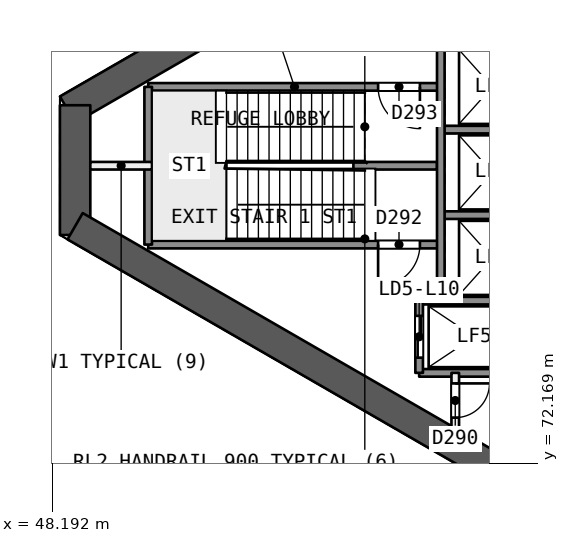
"""IFC4 building model, lengths in metres.
Left out: names, types, materials, properties, quantities, classifications, styles, units other than length and angle.
Written with IfcOpenShell. Run it as: python <this file> out.ifc"""

import sys

from ifc_helpers import new_model, si_unit, direction, frame, frame_2d, origin, place, context, subcontext, project, spatial, rectangle, extrude, element, fill, save


model = new_model("IFC4")
c1 = context("Model", 3, precision=1e-05, world=origin(), true_north=direction((0.0, 1.0)))
c2 = subcontext(c1, "Body", "Model", "MODEL_VIEW")
j1 = project(units=[si_unit("LENGTHUNIT", "METRE"), si_unit("PLANEANGLEUNIT", "RADIAN")], contexts=[c1])
p1 = place(None, origin())
s1 = spatial("IfcSite", under=j1, at=p1, CompositionType="ELEMENT")
p2 = place(p1, origin())
s2 = spatial("IfcBuilding", under=s1, at=p2, CompositionType="ELEMENT")
p3 = place(p2, frame((0.0, 0.0, 48.5)))
s3 = spatial("IfcBuildingStorey", under=s2, at=p3, CompositionType="ELEMENT", Elevation=48.5)
p4 = place(p3, frame((60.664, 88.443, 0.0), z_axis=(0.0, 0.0, 1.0), x_axis=(-0.866029478545, -0.499992942241, 0.0)))
e1 = element("IfcWall", 1, at=p4, inside=s3, PredefinedType="SHEAR", context=c2, shape_type="SweptSolid", body=[
    extrude(rectangle(XDim=13.933, YDim=0.8, at=frame_2d((6.967, 0.0))), origin(), (0.0, 0.0, 1.0), 4.4),
])
p5 = place(p3, frame((48.797, 81.592, 0.0), z_axis=(0.0, 0.0, 1.0), x_axis=(0.0, -1.0, 0.0)))
e2 = element("IfcWall", 2, at=p5, inside=s3, PredefinedType="SHEAR", context=c2, shape_type="SweptSolid", body=[
    extrude(rectangle(XDim=3.415, YDim=0.8, at=frame_2d((1.707, 0.0))), origin(), (0.0, 0.0, 1.0), 4.4),
])
p6 = place(p3, frame((48.797, 78.408, 0.0), z_axis=(0.0, 0.0, 1.0), x_axis=(0.866032504327, -0.499987701298, 0.0)))
e3 = element("IfcWall", 3, at=p6, inside=s3, PredefinedType="SHEAR", context=c2, shape_type="SweptSolid", body=[
    extrude(rectangle(XDim=14.102, YDim=0.8, at=frame_2d((7.051, 0.0))), origin(), (0.0, 0.0, 1.0), 4.4),
])
p7 = place(p3, frame((90.743, 46.516, 0.0), z_axis=(0.0, 0.0, 1.0), x_axis=(-0.866025105017, 0.50000051748, 0.0)))
e4 = element("IfcWall", 4, at=p7, inside=s3, PredefinedType="SOLIDWALL", context=c2, shape_type="SweptSolid", body=[
    extrude(rectangle(XDim=60.751, YDim=0.3, at=frame_2d((30.375, 0.0))), origin(), (0.0, 0.0, 1.0), 3.9),
])
p8 = place(p7, frame((3.562, 0.0, 0.6)))
e5 = element("IfcOpeningElement", 5, at=p8, cuts=e4, PredefinedType="OPENING", context=c2, shape_type="SweptSolid", body=[
    extrude(rectangle(XDim=3.0, YDim=2.4, at=frame_2d((1.5, 1.2))), frame((0.0, 0.161, 0.0), z_axis=(0.0, -1.0, 0.0), x_axis=(1.0, 0.0, 0.0)), (0.0, 0.0, 1.0), 0.321),
])
p9 = place(p7, frame((13.688, 0.0, 0.6)))
e6 = element("IfcOpeningElement", 6, at=p9, cuts=e4, PredefinedType="OPENING", context=c2, shape_type="SweptSolid", body=[
    extrude(rectangle(XDim=3.0, YDim=2.4, at=frame_2d((1.5, 1.2))), frame((0.0, 0.161, 0.0), z_axis=(0.0, -1.0, 0.0), x_axis=(1.0, 0.0, 0.0)), (0.0, 0.0, 1.0), 0.321),
])
p10 = place(p7, frame((23.813, 0.0, 0.6)))
e7 = element("IfcOpeningElement", 7, at=p10, cuts=e4, PredefinedType="OPENING", context=c2, shape_type="SweptSolid", body=[
    extrude(rectangle(XDim=3.0, YDim=2.4, at=frame_2d((1.5, 1.2))), frame((0.0, 0.161, 0.0), z_axis=(0.0, -1.0, 0.0), x_axis=(1.0, 0.0, 0.0)), (0.0, 0.0, 1.0), 0.321),
])
p11 = place(p7, frame((33.938, 0.0, 0.6)))
e8 = element("IfcOpeningElement", 8, at=p11, cuts=e4, PredefinedType="OPENING", context=c2, shape_type="SweptSolid", body=[
    extrude(rectangle(XDim=3.0, YDim=2.4, at=frame_2d((1.5, 1.2))), frame((0.0, 0.161, 0.0), z_axis=(0.0, -1.0, 0.0), x_axis=(1.0, 0.0, 0.0)), (0.0, 0.0, 1.0), 0.321),
])
p12 = place(p7, frame((44.063, 0.0, 0.6)))
e9 = element("IfcOpeningElement", 9, at=p12, cuts=e4, PredefinedType="OPENING", context=c2, shape_type="SweptSolid", body=[
    extrude(rectangle(XDim=3.0, YDim=2.4, at=frame_2d((1.5, 1.2))), frame((0.0, 0.161, 0.0), z_axis=(0.0, -1.0, 0.0), x_axis=(1.0, 0.0, 0.0)), (0.0, 0.0, 1.0), 0.321),
])
p13 = place(p7, frame((54.188, 0.0, 0.6)))
e10 = element("IfcOpeningElement", 10, at=p13, cuts=e4, PredefinedType="OPENING", context=c2, shape_type="SweptSolid", body=[
    extrude(rectangle(XDim=3.0, YDim=2.4, at=frame_2d((1.5, 1.2))), frame((0.0, 0.161, 0.0), z_axis=(0.0, -1.0, 0.0), x_axis=(1.0, 0.0, 0.0)), (0.0, 0.0, 1.0), 0.321),
])
p14 = place(p3, frame((58.42, 82.075, 0.0), z_axis=(0.0, 0.0, 1.0), x_axis=(-1.0, 0.0, 0.0)))
e11 = element("IfcWall", 11, at=p14, inside=s3, PredefinedType="SOLIDWALL", context=c2, shape_type="SweptSolid", body=[
    extrude(rectangle(XDim=7.7, YDim=0.2, at=frame_2d((3.85, 0.0))), origin(), (0.0, 0.0, 1.0), 3.9),
])
p15 = place(p14, frame((0.55, 0.0, 0.0)))
e12 = element("IfcOpeningElement", 12, at=p15, cuts=e11, PredefinedType="OPENING", context=c2, shape_type="SweptSolid", body=[
    extrude(rectangle(XDim=1.1, YDim=2.1, at=frame_2d((0.55, 1.05))), frame((0.0, 0.11, 0.0), z_axis=(0.0, -1.0, 0.0), x_axis=(1.0, 0.0, 0.0)), (0.0, 0.0, 1.0), 0.221),
])
p16 = place(p3, frame((60.9, 80.95, 0.0), z_axis=(0.0, 0.0, 1.0), x_axis=(-1.0, 0.0, 0.0)))
e13 = element("IfcWall", 13, at=p16, inside=s3, PredefinedType="SOLIDWALL", context=c2, shape_type="SweptSolid", body=[
    extrude(rectangle(XDim=2.48, YDim=0.2, at=frame_2d((1.24, 0.0))), origin(), (0.0, 0.0, 1.0), 3.9),
])
p17 = place(p3, frame((58.32, 80.0, 0.0), z_axis=(0.0, 0.0, 1.0), x_axis=(-1.0, 0.0, 0.0)))
e14 = element("IfcWall", 14, at=p17, inside=s3, PredefinedType="SOLIDWALL", context=c2, shape_type="SweptSolid", body=[
    extrude(rectangle(XDim=2.2, YDim=0.2, at=frame_2d((1.1, 0.0))), origin(), (0.0, 0.0, 1.0), 3.9),
])
p18 = place(p3, frame((50.82, 80.0, 0.0), z_axis=(0.0, 0.0, 1.0), x_axis=(-1.0, 0.0, 0.0)))
e15 = element("IfcWall", 15, at=p18, inside=s3, PredefinedType="PARTITIONING", context=c2, shape_type="SweptSolid", body=[
    extrude(rectangle(XDim=1.623, YDim=0.2, at=frame_2d((0.812, 0.0))), origin(), (0.0, 0.0, 1.0), 3.9),
])
p19 = place(p3, frame((60.9, 78.7, 0.0), z_axis=(0.0, 0.0, 1.0), x_axis=(-1.0, 0.0, 0.0)))
e16 = element("IfcWall", 16, at=p19, inside=s3, PredefinedType="SOLIDWALL", context=c2, shape_type="SweptSolid", body=[
    extrude(rectangle(XDim=2.48, YDim=0.2, at=frame_2d((1.24, 0.0))), origin(), (0.0, 0.0, 1.0), 3.9),
])
p20 = place(p3, frame((58.42, 77.925, 0.0), z_axis=(0.0, 0.0, 1.0), x_axis=(-1.0, 0.0, 0.0)))
e17 = element("IfcWall", 17, at=p20, inside=s3, PredefinedType="SOLIDWALL", context=c2, shape_type="SweptSolid", body=[
    extrude(rectangle(XDim=7.7, YDim=0.2, at=frame_2d((3.85, 0.0))), origin(), (0.0, 0.0, 1.0), 3.9),
])
p21 = place(p20, frame((0.55, 0.0, 0.0)))
e18 = element("IfcOpeningElement", 18, at=p21, cuts=e17, PredefinedType="OPENING", context=c2, shape_type="SweptSolid", body=[
    extrude(rectangle(XDim=1.1, YDim=2.1, at=frame_2d((0.55, 1.05))), frame((0.0, 0.11, 0.0), z_axis=(0.0, -1.0, 0.0), x_axis=(1.0, 0.0, 0.0)), (0.0, 0.0, 1.0), 0.221),
])
for number, where, z_axis, x_axis in (
    (19, (60.9, 76.45, 0.0), (0.0, 0.0, 1.0), (-1.0, 0.0, 0.0)),
    (20, (60.9, 74.55, 0.0), (0.0, 0.0, 1.0), (-1.0, 0.0, 0.0)),
):
    element("IfcWall", number, at=place(p3, frame(where, z_axis=z_axis, x_axis=x_axis)), inside=s3, PredefinedType="SOLIDWALL", context=c2, shape_type="SweptSolid", body=[
        extrude(rectangle(XDim=3.05, YDim=0.2, at=frame_2d((1.525, 0.0))), origin(), (0.0, 0.0, 1.0), 3.9),
    ])
p22 = place(p3, frame((58.8, 74.55, 0.0), z_axis=(0.0, 0.0, 1.0), x_axis=(0.0, -1.0, 0.0)))
e21 = element("IfcWall", 21, at=p22, inside=s3, PredefinedType="PARTITIONING", context=c2, shape_type="SweptSolid", body=[
    extrude(rectangle(XDim=1.455, YDim=0.2, at=frame_2d((0.728, 0.0))), origin(), (0.0, 0.0, 1.0), 3.9),
])
p23 = place(p22, frame((0.278, 0.0, 0.0)))
e22 = element("IfcOpeningElement", 22, at=p23, cuts=e21, PredefinedType="OPENING", context=c2, shape_type="SweptSolid", body=[
    extrude(rectangle(XDim=0.9, YDim=2.1, at=frame_2d((0.45, 1.05))), frame((0.0, 0.11, 0.0), z_axis=(0.0, -1.0, 0.0), x_axis=(1.0, 0.0, 0.0)), (0.0, 0.0, 1.0), 0.221),
])
p24 = place(p3, frame((58.42, 85.45, 0.0), z_axis=(0.0, 0.0, 1.0), x_axis=(0.0, -1.0, 0.0)))
e23 = element("IfcWall", 23, at=p24, inside=s3, PredefinedType="SOLIDWALL", context=c2, shape_type="SweptSolid", body=[
    extrude(rectangle(XDim=9.0, YDim=0.2, at=frame_2d((4.5, 0.0))), origin(), (0.0, 0.0, 1.0), 3.9),
])
p25 = place(p3, frame((57.85, 76.45, 0.0), z_axis=(0.0, 0.0, 1.0), x_axis=(0.0, -1.0, 0.0)))
e24 = element("IfcWall", 24, at=p25, inside=s3, PredefinedType="SOLIDWALL", context=c2, shape_type="SweptSolid", body=[
    extrude(rectangle(XDim=1.9, YDim=0.2, at=frame_2d((0.95, 0.0))), origin(), (0.0, 0.0, 1.0), 3.9),
])
p26 = place(p25, frame((0.4, 0.0, 0.0)))
e25 = element("IfcOpeningElement", 25, at=p26, cuts=e24, PredefinedType="OPENING", context=c2, shape_type="SweptSolid", body=[
    extrude(rectangle(XDim=1.1, YDim=2.1, at=frame_2d((0.55, 1.05))), frame((0.0, 0.11, 0.0), z_axis=(0.0, -1.0, 0.0), x_axis=(1.0, 0.0, 0.0)), (0.0, 0.0, 1.0), 0.221),
])
p27 = place(p3, frame((50.72, 82.075, 0.0), z_axis=(0.0, 0.0, 1.0), x_axis=(0.0, -1.0, 0.0)))
e26 = element("IfcWall", 26, at=p27, inside=s3, PredefinedType="SOLIDWALL", context=c2, shape_type="SweptSolid", body=[
    extrude(rectangle(XDim=4.15, YDim=0.2, at=frame_2d((2.075, 0.0))), origin(), (0.0, 0.0, 1.0), 3.9),
])
p28 = place(p26, origin())
e27 = element("IfcDoor", 27, at=p28, inside=s3, OperationType="SLIDING_TO_RIGHT", PredefinedType="NOTDEFINED", context=c2, shape_type="SweptSolid", body=[
    extrude(rectangle(XDim=1.1, YDim=2.1, at=frame_2d((0.55, 1.05))), frame((0.0, 0.025, 0.0), z_axis=(0.0, -1.0, 0.0), x_axis=(1.0, 0.0, 0.0)), (0.0, 0.0, 1.0), 0.05),
])
fill(e25, e27)
p29 = place(p23, origin())
e28 = element("IfcDoor", 28, at=p29, inside=s3, OperationType="SINGLE_SWING_LEFT", PredefinedType="NOTDEFINED", context=c2, shape_type="SweptSolid", body=[
    extrude(rectangle(XDim=0.9, YDim=2.1, at=frame_2d((0.45, 1.05))), frame((0.0, 0.025, 0.0), z_axis=(0.0, -1.0, 0.0), x_axis=(1.0, 0.0, 0.0)), (0.0, 0.0, 1.0), 0.05),
])
fill(e22, e28)
p30 = place(p21, origin())
e29 = element("IfcDoor", 29, at=p30, inside=s3, OperationType="SINGLE_SWING_RIGHT", PredefinedType="NOTDEFINED", context=c2, shape_type="SweptSolid", body=[
    extrude(rectangle(XDim=1.1, YDim=2.1, at=frame_2d((0.55, 1.05))), frame((0.0, 0.025, 0.0), z_axis=(0.0, -1.0, 0.0), x_axis=(1.0, 0.0, 0.0)), (0.0, 0.0, 1.0), 0.05),
])
fill(e18, e29)
p31 = place(p15, origin())
e30 = element("IfcDoor", 30, at=p31, inside=s3, OperationType="SINGLE_SWING_LEFT", PredefinedType="NOTDEFINED", context=c2, shape_type="SweptSolid", body=[
    extrude(rectangle(XDim=1.1, YDim=2.1, at=frame_2d((0.55, 1.05))), frame((0.0, 0.025, 0.0), z_axis=(0.0, -1.0, 0.0), x_axis=(1.0, 0.0, 0.0)), (0.0, 0.0, 1.0), 0.05),
])
fill(e12, e30)
save(model, sys.argv[1])
